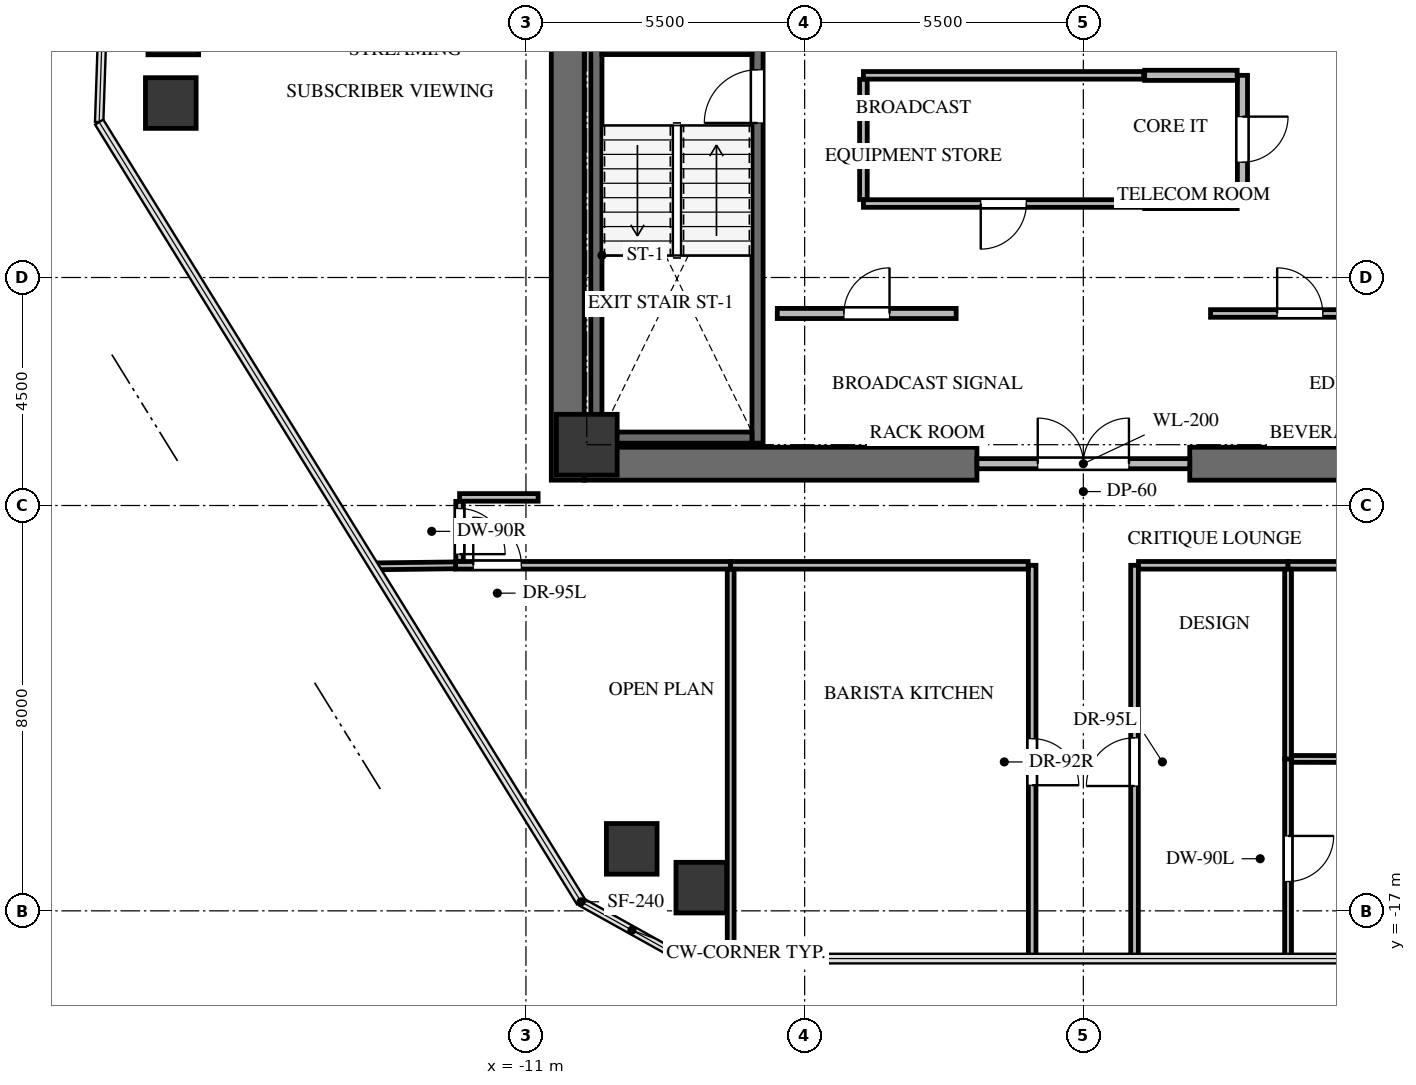
"""IFC4 building model, lengths in metres.
Left out: names, types, materials, properties, quantities, classifications, styles, units other than length and angle.
Written with IfcOpenShell. Run it as: python <this file> out.ifc"""

import sys

from ifc_helpers import new_model, si_unit, direction, frame, frame_2d, origin, origin_2d, place, context, subcontext, project, spatial, rectangle, extrude, source, transform, mapped, element, fill, save


model = new_model("IFC4")
c1 = context("Model", 3, precision=1e-05, world=origin(), true_north=direction((0.0, 1.0)))
c2 = subcontext(c1, "Body", "Model", "MODEL_VIEW")
j1 = project(units=[si_unit("LENGTHUNIT", "METRE"), si_unit("PLANEANGLEUNIT", "RADIAN")], contexts=[c1])
p1 = place(None, origin())
s1 = spatial("IfcSite", under=j1, at=p1, CompositionType="ELEMENT")
p2 = place(p1, origin())
s2 = spatial("IfcBuilding", under=s1, at=p2, CompositionType="ELEMENT")
p3 = place(p2, frame((0.0, 0.0, 187.0)))
s3 = spatial("IfcBuildingStorey", under=s2, at=p3, CompositionType="ELEMENT", Elevation=187.0)
p4 = place(p3, frame((-10.175, -8.5, 0.0), z_axis=(0.0, 0.0, 1.0), x_axis=(0.0, 1.0, 0.0)))
e1 = element("IfcWall", 1, at=p4, inside=s3, PredefinedType="SHEAR", context=c2, shape_type="SweptSolid", body=[
    extrude(rectangle(XDim=17.0, YDim=0.65, at=frame_2d((8.5, 0.0))), origin(), (0.0, 0.0, 1.0), 3.3),
])
for number, where, z_axis, x_axis in (
    (2, (-9.85, -8.175, 0.0), (0.0, 0.0, 1.0), (1.0, 0.0, 0.0)),
    (3, (2.1, -8.175, 0.0), (0.0, 0.0, 1.0), (1.0, 0.0, 0.0)),
):
    element("IfcWall", number, at=place(p3, frame(where, z_axis=z_axis, x_axis=x_axis)), inside=s3, PredefinedType="SHEAR", context=c2, shape_type="SweptSolid", body=[
        extrude(rectangle(XDim=7.75, YDim=0.65, at=frame_2d((3.875, 0.0))), origin(), (0.0, 0.0, 1.0), 3.3),
    ])
p5 = place(p3, frame((-6.43, -7.77, -0.24), z_axis=(0.0, 0.0, 1.0), x_axis=(0.0, 1.0, 0.0)))
e4 = element("IfcWall", 4, at=p5, inside=s3, PredefinedType="SHEAR", context=c2, shape_type="SweptSolid", body=[
    extrude(rectangle(XDim=7.89, YDim=0.22, at=frame_2d((3.945, 0.0))), origin(), (0.0, 0.0, 1.0), 3.3),
])
p6 = place(p5, frame((6.32, 0.0, 0.0)))
e5 = element("IfcOpeningElement", 5, at=p6, cuts=e4, PredefinedType="OPENING", context=c2, shape_type="SweptSolid", body=[
    extrude(rectangle(XDim=1.05, YDim=2.15, at=frame_2d((0.525, 1.075))), frame((0.0, 0.12, 0.0), z_axis=(0.0, -1.0, 0.0), x_axis=(1.0, 0.0, 0.0)), (0.0, 0.0, 1.0), 0.24),
])
p7 = place(p3, frame((-9.61, 0.12, -0.24), z_axis=(0.0, 0.0, 1.0), x_axis=(0.0, -1.0, 0.0)))
e6 = element("IfcWall", 6, at=p7, inside=s3, PredefinedType="SHEAR", context=c2, shape_type="SweptSolid", body=[
    extrude(rectangle(XDim=7.89, YDim=0.22, at=frame_2d((3.945, 0.0))), origin(), (0.0, 0.0, 1.0), 3.3),
])
for number, where, z_axis, x_axis in (
    (7, (-9.5, -7.66, -0.24), (0.0, 0.0, 1.0), (1.0, 0.0, 0.0)),
    (8, (-6.54, 0.01, -0.24), (0.0, 0.0, 1.0), (-1.0, 0.0, 0.0)),
):
    element("IfcWall", number, at=place(p3, frame(where, z_axis=z_axis, x_axis=x_axis)), inside=s3, PredefinedType="SHEAR", context=c2, shape_type="SweptSolid", body=[
        extrude(rectangle(XDim=2.96, YDim=0.22, at=frame_2d((1.48, 0.0))), origin(), (0.0, 0.0, 1.0), 3.3),
    ])
m1 = source(origin(), c2, "Body", "SweptSolid", [
    extrude(rectangle(XDim=1.2, YDim=1.2, at=origin_2d()), origin(), (0.0, 0.0, 1.0), 3.3),
])
p8 = place(p3, frame((-9.8, -7.8, -0.24), z_axis=(0.0, 0.0, 1.0), x_axis=(1.0, 0.0, 0.0)))
e9 = element("IfcColumn", 9, at=p8, inside=s3, PredefinedType="COLUMN", context=c2, shape_type="MappedRepresentation", body=[
    mapped(m1, transform((0.0, 0.0, 0.0), x_axis=(1.0, 0.0, 0.0), y_axis=(0.0, 1.0, 0.0), z_axis=(0.0, 0.0, 1.0), scale=1.0)),
])
m2 = source(origin(), c2, "Body", "SweptSolid", [
    extrude(rectangle(XDim=1.0, YDim=1.0, at=origin_2d()), origin(), (0.0, 0.0, 1.0), 3.3),
])
for number, where, z_axis, x_axis in (
    (10, (-8.913, -15.776, -0.24), (0.0, 0.0, 1.0), (1.0, 0.0, 0.0)),
    (11, (-18.009, -1.057, -0.24), (0.0, 0.0, 1.0), (1.0, 0.0, 0.0)),
    (12, (-17.96, 0.396, -0.24), (0.0, 0.0, 1.0), (1.0, 0.0, 0.0)),
    (13, (-7.54, -16.542, -0.24), (0.0, 0.0, 1.0), (1.0, 0.0, 0.0)),
):
    element("IfcColumn", number, at=place(p3, frame(where, z_axis=z_axis, x_axis=x_axis)), inside=s3, PredefinedType="COLUMN", context=c2, shape_type="MappedRepresentation", body=[
        mapped(m2, transform((0.0, 0.0, 0.0), x_axis=(1.0, 0.0, 0.0), y_axis=(0.0, 1.0, 0.0), z_axis=(0.0, 0.0, 1.0), scale=1.0)),
    ])
p9 = place(p3, frame((-2.1, -8.175, 0.0), z_axis=(0.0, 0.0, 1.0), x_axis=(1.0, 0.0, 0.0)))
e14 = element("IfcWall", 14, at=p9, inside=s3, PredefinedType="SOLIDWALL", context=c2, shape_type="SweptSolid", body=[
    extrude(rectangle(XDim=4.2, YDim=0.2, at=frame_2d((2.1, 0.0))), origin(), (0.0, 0.0, 1.0), 3.045),
])
p10 = place(p9, frame((1.2, 0.0, 0.0)))
e15 = element("IfcOpeningElement", 15, at=p10, cuts=e14, PredefinedType="OPENING", context=c2, shape_type="SweptSolid", body=[
    extrude(rectangle(XDim=1.8, YDim=2.15, at=frame_2d((0.9, 1.075))), frame((0.0, 0.11, 0.0), z_axis=(0.0, -1.0, 0.0), x_axis=(1.0, 0.0, 0.0)), (0.0, 0.0, 1.0), 0.22),
])
p11 = place(p3, frame((-6.04, -5.21, 0.0), z_axis=(0.0, 0.0, 1.0), x_axis=(1.0, 0.0, 0.0)))
e16 = element("IfcWall", 16, at=p11, inside=s3, PredefinedType="SOLIDWALL", context=c2, shape_type="SweptSolid", body=[
    extrude(rectangle(XDim=3.53, YDim=0.2, at=frame_2d((1.765, 0.0))), origin(), (0.0, 0.0, 1.0), 3.045),
])
p12 = place(p11, frame((1.315, 0.0, 0.0)))
e17 = element("IfcOpeningElement", 17, at=p12, cuts=e16, PredefinedType="OPENING", context=c2, shape_type="SweptSolid", body=[
    extrude(rectangle(XDim=0.9, YDim=2.05, at=frame_2d((0.45, 1.025))), frame((0.0, 0.11, 0.0), z_axis=(0.0, -1.0, 0.0), x_axis=(1.0, 0.0, 0.0)), (0.0, 0.0, 1.0), 0.22),
])
p13 = place(p3, frame((2.51, -5.21, 0.0), z_axis=(0.0, 0.0, 1.0), x_axis=(1.0, 0.0, 0.0)))
e18 = element("IfcWall", 18, at=p13, inside=s3, PredefinedType="PARTITIONING", context=c2, shape_type="SweptSolid", body=[
    extrude(rectangle(XDim=3.53, YDim=0.15, at=frame_2d((1.765, 0.0))), origin(), (0.0, 0.0, 1.0), 3.045),
])
p14 = place(p13, frame((1.315, 0.0, 0.0)))
e19 = element("IfcOpeningElement", 19, at=p14, cuts=e18, PredefinedType="OPENING", context=c2, shape_type="SweptSolid", body=[
    extrude(rectangle(XDim=0.9, YDim=2.05, at=frame_2d((0.45, 1.025))), frame((0.0, 0.085, 0.0), z_axis=(0.0, -1.0, 0.0), x_axis=(1.0, 0.0, 0.0)), (0.0, 0.0, 1.0), 0.17),
])
p15 = place(p3, frame((1.19, -3.04, 0.0), z_axis=(0.0, 0.0, 1.0), x_axis=(-1.0, 0.0, 0.0)))
e20 = element("IfcWall", 20, at=p15, inside=s3, PredefinedType="PARTITIONING", context=c2, shape_type="SweptSolid", body=[
    extrude(rectangle(XDim=5.53, YDim=0.15, at=frame_2d((2.765, 0.0))), origin(), (0.0, 0.0, 1.0), 3.045),
])
p16 = place(p15, frame((2.315, 0.0, 0.0)))
e21 = element("IfcOpeningElement", 21, at=p16, cuts=e20, PredefinedType="OPENING", context=c2, shape_type="SweptSolid", body=[
    extrude(rectangle(XDim=0.9, YDim=2.05, at=frame_2d((0.45, 1.025))), frame((0.0, 0.085, 0.0), z_axis=(0.0, -1.0, 0.0), x_axis=(1.0, 0.0, 0.0)), (0.0, 0.0, 1.0), 0.17),
])
p17 = place(p3, frame((-4.34, -0.51, 0.0), z_axis=(0.0, 0.0, 1.0), x_axis=(1.0, 0.0, 0.0)))
e22 = element("IfcWall", 22, at=p17, inside=s3, PredefinedType="PARTITIONING", context=c2, shape_type="SweptSolid", body=[
    extrude(rectangle(XDim=5.53, YDim=0.15, at=frame_2d((2.765, 0.0))), origin(), (0.0, 0.0, 1.0), 3.045),
])
p18 = place(p3, frame((-4.34, -2.961, 0.0), z_axis=(0.0, 0.0, 1.0), x_axis=(0.0, 1.0, 0.0)))
e23 = element("IfcWall", 23, at=p18, inside=s3, PredefinedType="PARTITIONING", context=c2, shape_type="SweptSolid", body=[
    extrude(rectangle(XDim=2.372, YDim=0.15, at=frame_2d((1.186, 0.0))), origin(), (0.0, 0.0, 1.0), 3.045),
])
p19 = place(p3, frame((3.14, -0.51, 0.0), z_axis=(0.0, 0.0, 1.0), x_axis=(0.0, -1.0, 0.0)))
e24 = element("IfcWall", 24, at=p19, inside=s3, PredefinedType="SOLIDWALL", context=c2, shape_type="SweptSolid", body=[
    extrude(rectangle(XDim=2.53, YDim=0.2, at=frame_2d((1.265, 0.0))), origin(), (0.0, 0.0, 1.0), 3.045),
])
p20 = place(p19, frame((0.815, 0.0, 0.0)))
e25 = element("IfcOpeningElement", 25, at=p20, cuts=e24, PredefinedType="OPENING", context=c2, shape_type="SweptSolid", body=[
    extrude(rectangle(XDim=0.9, YDim=2.05, at=frame_2d((0.45, 1.025))), frame((0.0, 0.11, 0.0), z_axis=(0.0, -1.0, 0.0), x_axis=(1.0, 0.0, 0.0)), (0.0, 0.0, 1.0), 0.22),
])
for number, where, z_axis, x_axis in (
    (26, (3.036, -3.04, 0.0), (0.0, 0.0, 1.0), (-1.0, 0.0, 0.0)),
    (27, (1.21, -0.51, 0.0), (0.0, 0.0, 1.0), (1.0, 0.0, 0.0)),
):
    element("IfcWall", number, at=place(p3, frame(where, z_axis=z_axis, x_axis=x_axis)), inside=s3, PredefinedType="SOLIDWALL", context=c2, shape_type="SweptSolid", body=[
        extrude(rectangle(XDim=1.826, YDim=0.2, at=frame_2d((0.913, 0.0))), origin(), (0.0, 0.0, 1.0), 3.045),
    ])
p21 = place(p3, frame((-12.39, -10.18, 0.0), z_axis=(0.0, 0.0, 1.0), x_axis=(1.0, 0.0, 0.0)))
e28 = element("IfcWall", 28, at=p21, inside=s3, PredefinedType="PARTITIONING", context=c2, shape_type="SweptSolid", body=[
    extrude(rectangle(XDim=5.43, YDim=0.15, at=frame_2d((2.715, 0.0))), origin(), (0.0, 0.0, 1.0), 2.399),
])
p22 = place(p21, frame((0.35, 0.0, 0.0)))
e29 = element("IfcOpeningElement", 29, at=p22, cuts=e28, PredefinedType="OPENING", context=c2, shape_type="SweptSolid", body=[
    extrude(rectangle(XDim=0.95, YDim=2.1, at=frame_2d((0.475, 1.05))), frame((0.0, 0.085, 0.0), z_axis=(0.0, -1.0, 0.0), x_axis=(1.0, 0.0, 0.0)), (0.0, 0.0, 1.0), 0.17),
])
p23 = place(p3, frame((-1.01, -10.18, 0.0), z_axis=(0.0, 0.0, 1.0), x_axis=(0.0, -1.0, 0.0)))
e30 = element("IfcWall", 30, at=p23, inside=s3, PredefinedType="PARTITIONING", context=c2, shape_type="SweptSolid", body=[
    extrude(rectangle(XDim=7.762, YDim=0.15, at=frame_2d((3.881, 0.0))), origin(), (0.0, 0.0, 1.0), 2.399),
])
p24 = place(p23, frame((3.421, 0.0, 0.0)))
e31 = element("IfcOpeningElement", 31, at=p24, cuts=e30, PredefinedType="OPENING", context=c2, shape_type="SweptSolid", body=[
    extrude(rectangle(XDim=0.92, YDim=2.1, at=frame_2d((0.46, 1.05))), frame((0.0, 0.085, 0.0), z_axis=(0.0, -1.0, 0.0), x_axis=(1.0, 0.0, 0.0)), (0.0, 0.0, 1.0), 0.17),
])
p25 = place(p3, frame((-6.96, -10.18, 0.0), z_axis=(0.0, 0.0, 1.0), x_axis=(1.0, 0.0, 0.0)))
e32 = element("IfcWall", 32, at=p25, inside=s3, PredefinedType="PARTITIONING", context=c2, shape_type="SweptSolid", body=[
    extrude(rectangle(XDim=5.871, YDim=0.15, at=frame_2d((2.936, 0.0))), origin(), (0.0, 0.0, 1.0), 2.242),
])
p26 = place(p3, frame((1.01, -17.942, 0.0), z_axis=(0.0, 0.0, 1.0), x_axis=(0.0, 1.0, 0.0)))
e33 = element("IfcWall", 33, at=p26, inside=s3, PredefinedType="PARTITIONING", context=c2, shape_type="SweptSolid", body=[
    extrude(rectangle(XDim=7.762, YDim=0.15, at=frame_2d((3.881, 0.0))), origin(), (0.0, 0.0, 1.0), 2.399),
])
p27 = place(p26, frame((3.406, 0.0, 0.0)))
e34 = element("IfcOpeningElement", 34, at=p27, cuts=e33, PredefinedType="OPENING", context=c2, shape_type="SweptSolid", body=[
    extrude(rectangle(XDim=0.95, YDim=2.1, at=frame_2d((0.475, 1.05))), frame((0.0, 0.085, 0.0), z_axis=(0.0, -1.0, 0.0), x_axis=(1.0, 0.0, 0.0)), (0.0, 0.0, 1.0), 0.17),
])
p28 = place(p3, frame((1.089, -10.18, 0.0), z_axis=(0.0, 0.0, 1.0), x_axis=(1.0, 0.0, 0.0)))
e35 = element("IfcWall", 35, at=p28, inside=s3, PredefinedType="PARTITIONING", context=c2, shape_type="SweptSolid", body=[
    extrude(rectangle(XDim=2.951, YDim=0.15, at=frame_2d((1.476, 0.0))), origin(), (0.0, 0.0, 1.0), 3.045),
])
p29 = place(p3, frame((4.04, -10.18, 0.0), z_axis=(0.0, 0.0, 1.0), x_axis=(1.0, 0.0, 0.0)))
e36 = element("IfcWall", 36, at=p29, inside=s3, PredefinedType="PARTITIONING", context=c2, shape_type="SweptSolid", body=[
    extrude(rectangle(XDim=8.22, YDim=0.15, at=frame_2d((4.11, 0.0))), origin(), (0.0, 0.0, 1.0), 2.242),
])
p30 = place(p29, frame((3.635, 0.0, 0.0)))
e37 = element("IfcOpeningElement", 37, at=p30, cuts=e36, PredefinedType="OPENING", context=c2, shape_type="SweptSolid", body=[
    extrude(rectangle(XDim=0.95, YDim=2.1, at=frame_2d((0.475, 1.05))), frame((0.0, 0.085, 0.0), z_axis=(0.0, -1.0, 0.0), x_axis=(1.0, 0.0, 0.0)), (0.0, 0.0, 1.0), 0.17),
])
p31 = place(p3, frame((-10.76, -8.84, 0.0), z_axis=(0.0, 0.0, 1.0), x_axis=(-1.0, 0.0, 0.0)))
e38 = element("IfcWall", 38, at=p31, inside=s3, PredefinedType="PARTITIONING", context=c2, shape_type="SweptSolid", body=[
    extrude(rectangle(XDim=1.55, YDim=0.15, at=frame_2d((0.775, 0.0))), origin(), (0.0, 0.0, 1.0), 3.045),
])
p32 = place(p3, frame((-12.31, -8.919, 0.0), z_axis=(0.0, 0.0, 1.0), x_axis=(0.0, -1.0, 0.0)))
e39 = element("IfcWall", 39, at=p32, inside=s3, PredefinedType="PARTITIONING", context=c2, shape_type="SweptSolid", body=[
    extrude(rectangle(XDim=1.182, YDim=0.15, at=frame_2d((0.591, 0.0))), origin(), (0.0, 0.0, 1.0), 2.399),
])
p33 = place(p32, frame((0.141, 0.0, 0.0)))
e40 = element("IfcOpeningElement", 40, at=p33, cuts=e39, PredefinedType="OPENING", context=c2, shape_type="SweptSolid", body=[
    extrude(rectangle(XDim=0.9, YDim=2.05, at=frame_2d((0.45, 1.025))), frame((0.0, 0.085, 0.0), z_axis=(0.0, -1.0, 0.0), x_axis=(1.0, 0.0, 0.0)), (0.0, 0.0, 1.0), 0.17),
])
p34 = place(p3, frame((-6.96, -10.259, 0.0), z_axis=(0.0, 0.0, 1.0), x_axis=(0.0, -1.0, 0.0)))
e41 = element("IfcWall", 41, at=p34, inside=s3, PredefinedType="PARTITIONING", context=c2, shape_type="SweptSolid", body=[
    extrude(rectangle(XDim=7.683, YDim=0.135, at=frame_2d((3.841, 0.0))), origin(), (0.0, 0.0, 1.0), 2.242),
])
p35 = place(p3, frame((-14.004, -10.201, 0.0), z_axis=(0.0, 0.0, 1.0), x_axis=(0.999923084603, 0.012402615782, 0.0)))
e42 = element("IfcWall", 42, at=p35, inside=s3, PredefinedType="PARTITIONING", context=c2, shape_type="SweptSolid", body=[
    extrude(rectangle(XDim=1.614, YDim=0.135, at=frame_2d((0.807, 0.0))), origin(), (0.0, 0.0, 1.0), 2.399),
])
p36 = place(p3, frame((4.04, -14.001, 0.0), z_axis=(0.0, 0.0, 1.0), x_axis=(0.0, -1.0, 0.0)))
e43 = element("IfcWall", 43, at=p36, inside=s3, PredefinedType="PARTITIONING", context=c2, shape_type="SweptSolid", body=[
    extrude(rectangle(XDim=3.941, YDim=0.135, at=frame_2d((1.97, 0.0))), origin(), (0.0, 0.0, 1.0), 2.399),
])
p37 = place(p36, frame((1.521, 0.0, 0.0)))
e44 = element("IfcOpeningElement", 44, at=p37, cuts=e43, PredefinedType="OPENING", context=c2, shape_type="SweptSolid", body=[
    extrude(rectangle(XDim=0.9, YDim=2.05, at=frame_2d((0.45, 1.025))), frame((0.0, 0.078, 0.0), z_axis=(0.0, -1.0, 0.0), x_axis=(1.0, 0.0, 0.0)), (0.0, 0.0, 1.0), 0.155),
])
p38 = place(p3, frame((4.04, -10.259, 0.0), z_axis=(0.0, 0.0, 1.0), x_axis=(0.0, -1.0, 0.0)))
e45 = element("IfcWall", 45, at=p38, inside=s3, PredefinedType="PARTITIONING", context=c2, shape_type="SweptSolid", body=[
    extrude(rectangle(XDim=3.742, YDim=0.135, at=frame_2d((1.871, 0.0))), origin(), (0.0, 0.0, 1.0), 3.045),
])
p39 = place(p3, frame((4.112, -14.001, 0.0), z_axis=(0.0, 0.0, 1.0), x_axis=(0.999997597863, -0.002191864053, 0.0)))
e46 = element("IfcWall", 46, at=p39, inside=s3, PredefinedType="PARTITIONING", context=c2, shape_type="SweptSolid", body=[
    extrude(rectangle(XDim=10.582, YDim=0.135, at=frame_2d((5.291, 0.0))), origin(), (0.0, 0.0, 1.0), 2.242),
])
m3 = source(origin(), c2, "Body", "SweptSolid", [
    extrude(rectangle(XDim=1.05, YDim=2.15, at=frame_2d((0.525, 1.075))), frame((0.0, 0.025, 0.0), z_axis=(0.0, -1.0, 0.0), x_axis=(1.0, 0.0, 0.0)), (0.0, 0.0, 1.0), 0.05),
])
p40 = place(p6, origin())
e47 = element("IfcDoor", 47, at=p40, inside=s3, OperationType="SINGLE_SWING_LEFT", PredefinedType="DOOR", context=c2, shape_type="MappedRepresentation", body=[
    mapped(m3, transform((0.0, 0.0, 0.0), x_axis=(1.0, 0.0, 0.0), y_axis=(0.0, 1.0, 0.0), z_axis=(0.0, 0.0, 1.0), scale=1.0)),
])
fill(e5, e47)
m4 = source(origin(), c2, "Body", "SweptSolid", [
    extrude(rectangle(XDim=1.8, YDim=2.15, at=frame_2d((0.9, 1.075))), frame((0.0, 0.025, 0.0), z_axis=(0.0, -1.0, 0.0), x_axis=(1.0, 0.0, 0.0)), (0.0, 0.0, 1.0), 0.05),
])
p41 = place(p10, origin())
e48 = element("IfcDoor", 48, at=p41, inside=s3, OperationType="DOUBLE_DOOR_SINGLE_SWING", PredefinedType="DOOR", context=c2, shape_type="MappedRepresentation", body=[
    mapped(m4, transform((0.0, 0.0, 0.0), x_axis=(1.0, 0.0, 0.0), y_axis=(0.0, 1.0, 0.0), z_axis=(0.0, 0.0, 1.0), scale=1.0)),
])
fill(e15, e48)
m5 = source(origin(), c2, "Body", "SweptSolid", [
    extrude(rectangle(XDim=0.9, YDim=2.05, at=frame_2d((0.45, 1.025))), frame((0.0, 0.025, 0.0), z_axis=(0.0, -1.0, 0.0), x_axis=(1.0, 0.0, 0.0)), (0.0, 0.0, 1.0), 0.05),
])
p42 = place(p12, origin())
e49 = element("IfcDoor", 49, at=p42, inside=s3, OperationType="SINGLE_SWING_RIGHT", PredefinedType="DOOR", context=c2, shape_type="MappedRepresentation", body=[
    mapped(m5, transform((0.0, 0.0, 0.0), x_axis=(1.0, 0.0, 0.0), y_axis=(0.0, 1.0, 0.0), z_axis=(0.0, 0.0, 1.0), scale=1.0)),
])
fill(e17, e49)
m6 = source(origin(), c2, "Body", "SweptSolid", [
    extrude(rectangle(XDim=0.9, YDim=2.05, at=frame_2d((0.45, 1.025))), frame((0.0, 0.025, 0.0), z_axis=(0.0, -1.0, 0.0), x_axis=(1.0, 0.0, 0.0)), (0.0, 0.0, 1.0), 0.05),
])
p43 = place(p14, origin())
e50 = element("IfcDoor", 50, at=p43, inside=s3, OperationType="SINGLE_SWING_LEFT", PredefinedType="DOOR", context=c2, shape_type="MappedRepresentation", body=[
    mapped(m6, transform((0.0, 0.0, 0.0), x_axis=(1.0, 0.0, 0.0), y_axis=(0.0, 1.0, 0.0), z_axis=(0.0, 0.0, 1.0), scale=1.0)),
])
fill(e19, e50)
p44 = place(p16, origin())
e51 = element("IfcDoor", 51, at=p44, inside=s3, OperationType="SINGLE_SWING_RIGHT", PredefinedType="DOOR", context=c2, shape_type="MappedRepresentation", body=[
    mapped(m5, transform((0.0, 0.0, 0.0), x_axis=(1.0, 0.0, 0.0), y_axis=(0.0, 1.0, 0.0), z_axis=(0.0, 0.0, 1.0), scale=1.0)),
])
fill(e21, e51)
p45 = place(p20, origin())
e52 = element("IfcDoor", 52, at=p45, inside=s3, OperationType="SINGLE_SWING_LEFT", PredefinedType="DOOR", context=c2, shape_type="MappedRepresentation", body=[
    mapped(m6, transform((0.0, 0.0, 0.0), x_axis=(1.0, 0.0, 0.0), y_axis=(0.0, 1.0, 0.0), z_axis=(0.0, 0.0, 1.0), scale=1.0)),
])
fill(e25, e52)
m7 = source(origin(), c2, "Body", "SweptSolid", [
    extrude(rectangle(XDim=0.95, YDim=2.1, at=frame_2d((0.475, 1.05))), frame((0.0, 0.025, 0.0), z_axis=(0.0, -1.0, 0.0), x_axis=(1.0, 0.0, 0.0)), (0.0, 0.0, 1.0), 0.05),
])
p46 = place(p22, origin())
e53 = element("IfcDoor", 53, at=p46, inside=s3, OperationType="SINGLE_SWING_LEFT", PredefinedType="DOOR", context=c2, shape_type="MappedRepresentation", body=[
    mapped(m7, transform((0.0, 0.0, 0.0), x_axis=(1.0, 0.0, 0.0), y_axis=(0.0, 1.0, 0.0), z_axis=(0.0, 0.0, 1.0), scale=1.0)),
])
fill(e29, e53)
m8 = source(origin(), c2, "Body", "SweptSolid", [
    extrude(rectangle(XDim=0.92, YDim=2.1, at=frame_2d((0.46, 1.05))), frame((0.0, 0.025, 0.0), z_axis=(0.0, -1.0, 0.0), x_axis=(1.0, 0.0, 0.0)), (0.0, 0.0, 1.0), 0.05),
])
p47 = place(p24, origin())
e54 = element("IfcDoor", 54, at=p47, inside=s3, OperationType="SINGLE_SWING_RIGHT", PredefinedType="DOOR", context=c2, shape_type="MappedRepresentation", body=[
    mapped(m8, transform((0.0, 0.0, 0.0), x_axis=(1.0, 0.0, 0.0), y_axis=(0.0, 1.0, 0.0), z_axis=(0.0, 0.0, 1.0), scale=1.0)),
])
fill(e31, e54)
p48 = place(p27, origin())
e55 = element("IfcDoor", 55, at=p48, inside=s3, OperationType="SINGLE_SWING_LEFT", PredefinedType="DOOR", context=c2, shape_type="MappedRepresentation", body=[
    mapped(m7, transform((0.0, 0.0, 0.0), x_axis=(1.0, 0.0, 0.0), y_axis=(0.0, 1.0, 0.0), z_axis=(0.0, 0.0, 1.0), scale=1.0)),
])
fill(e34, e55)
m9 = source(origin(), c2, "Body", "SweptSolid", [
    extrude(rectangle(XDim=0.9, YDim=2.05, at=frame_2d((0.45, 1.025))), frame((0.0, 0.025, 0.0), z_axis=(0.0, -1.0, 0.0), x_axis=(1.0, 0.0, 0.0)), (0.0, 0.0, 1.0), 0.05),
])
p49 = place(p33, origin())
e56 = element("IfcDoor", 56, at=p49, inside=s3, OperationType="SINGLE_SWING_RIGHT", PredefinedType="DOOR", context=c2, shape_type="MappedRepresentation", body=[
    mapped(m9, transform((0.0, 0.0, 0.0), x_axis=(1.0, 0.0, 0.0), y_axis=(0.0, 1.0, 0.0), z_axis=(0.0, 0.0, 1.0), scale=1.0)),
])
fill(e40, e56)
m10 = source(origin(), c2, "Body", "SweptSolid", [
    extrude(rectangle(XDim=0.9, YDim=2.05, at=frame_2d((0.45, 1.025))), frame((0.0, 0.025, 0.0), z_axis=(0.0, -1.0, 0.0), x_axis=(1.0, 0.0, 0.0)), (0.0, 0.0, 1.0), 0.05),
])
p50 = place(p37, origin())
e57 = element("IfcDoor", 57, at=p50, inside=s3, OperationType="SINGLE_SWING_LEFT", PredefinedType="DOOR", context=c2, shape_type="MappedRepresentation", body=[
    mapped(m10, transform((0.0, 0.0, 0.0), x_axis=(1.0, 0.0, 0.0), y_axis=(0.0, 1.0, 0.0), z_axis=(0.0, 0.0, 1.0), scale=1.0)),
])
fill(e44, e57)
save(model, sys.argv[1])
